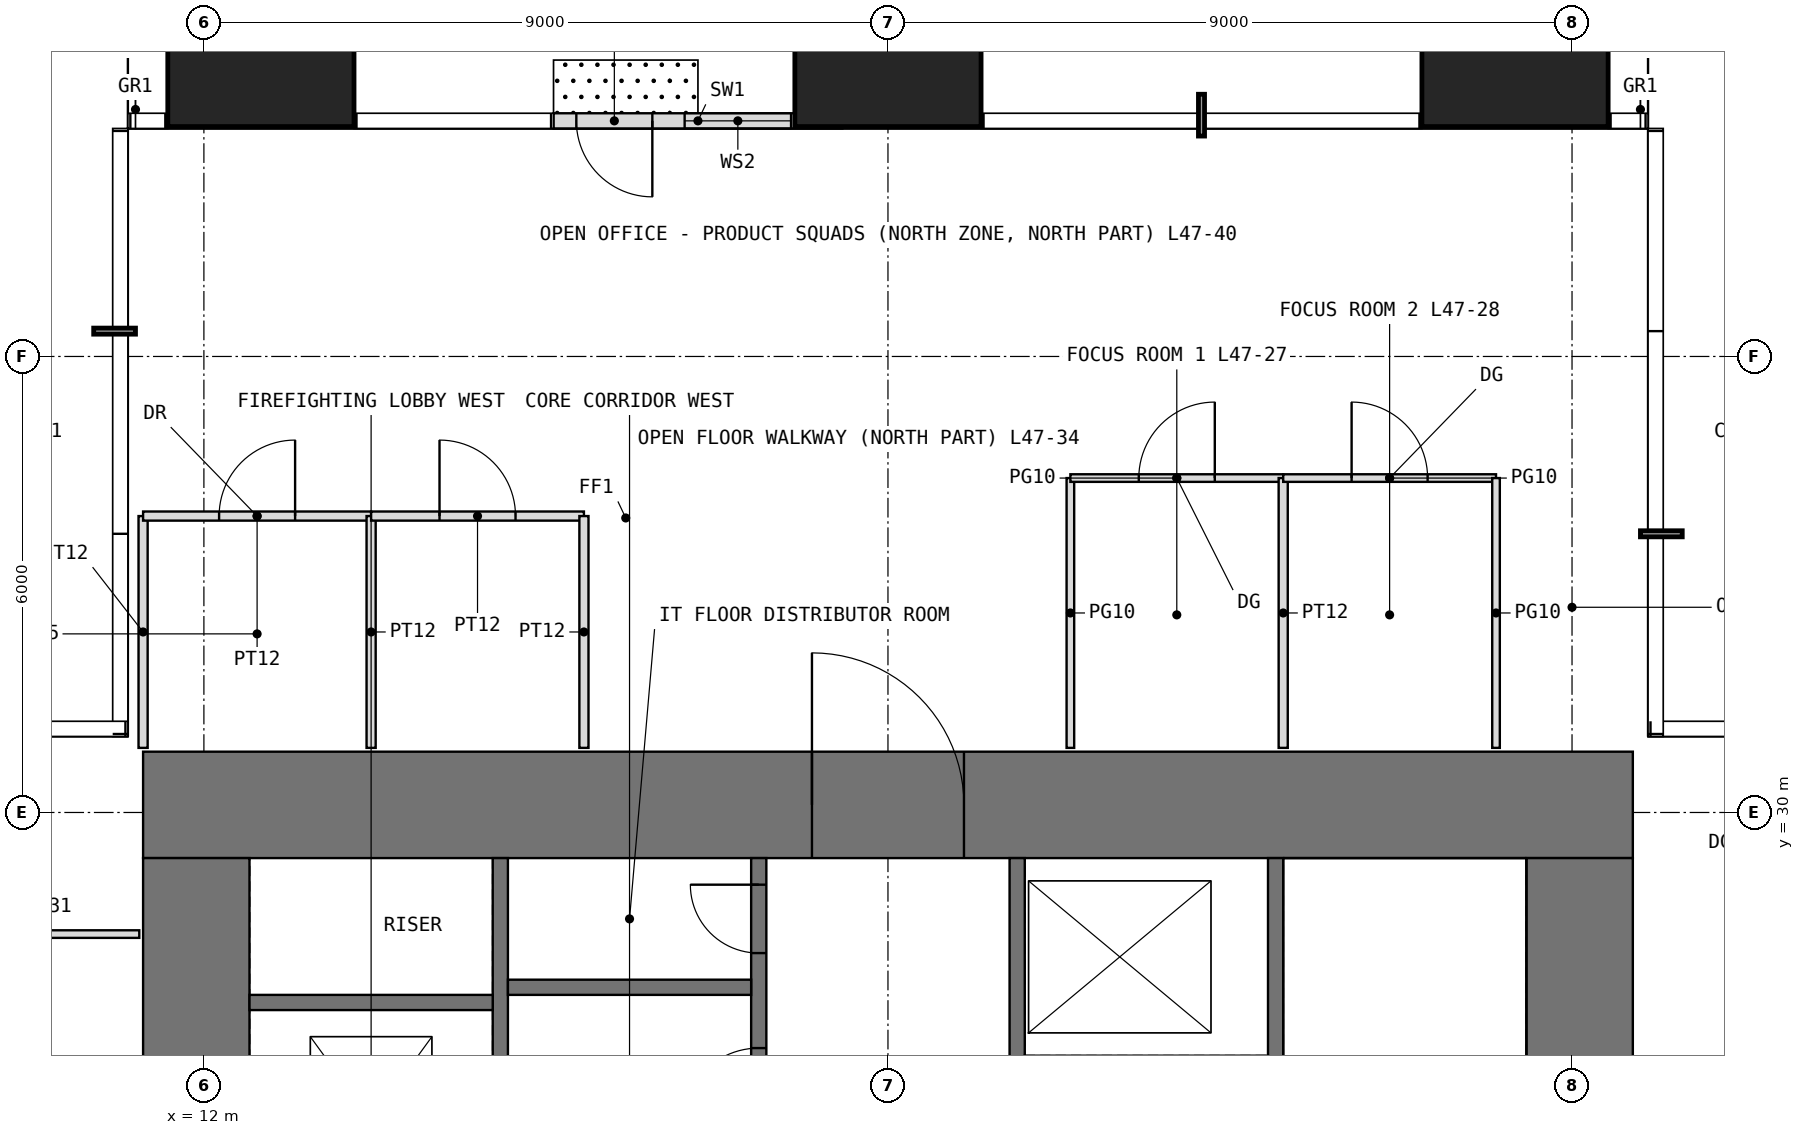
"""IFC4 building model, lengths in metres.
Left out: names, types, materials, properties, quantities, classifications, styles, units other than length and angle.
Written with IfcOpenShell. Run it as: python <this file> out.ifc"""

import sys

from ifc_helpers import new_model, si_unit, direction, frame, frame_2d, origin, origin_2d, place, context, subcontext, project, spatial, rectangle, extrude, element, fill, save


model = new_model("IFC4")
c1 = context("Model", 3, precision=1e-05, world=origin(), true_north=direction((0.0, 1.0)))
c2 = subcontext(c1, "Body", "Model", "MODEL_VIEW")
j1 = project(units=[si_unit("LENGTHUNIT", "METRE"), si_unit("PLANEANGLEUNIT", "RADIAN")], contexts=[c1])
p1 = place(None, origin())
s1 = spatial("IfcSite", under=j1, at=p1, CompositionType="ELEMENT")
p2 = place(p1, origin())
s2 = spatial("IfcBuilding", under=s1, at=p2, CompositionType="ELEMENT")
p3 = place(p2, frame((0.0, 0.0, 198.5)))
s3 = spatial("IfcBuildingStorey", under=s2, at=p3, CompositionType="ELEMENT", Elevation=198.5)
for number, where, z_axis, x_axis in (
    (1, (12.75, 40.25, 0.0), (0.0, 0.0, 1.0), (1.0, 0.0, 0.0)),
    (2, (21.0, 40.25, 0.0), (0.0, 0.0, 1.0), (1.0, 0.0, 0.0)),
    (3, (29.25, 40.25, 0.0), (0.0, 0.0, 1.0), (1.0, 0.0, 0.0)),
):
    element("IfcColumn", number, at=place(p3, frame(where, z_axis=z_axis, x_axis=x_axis)), inside=s3, PredefinedType="COLUMN", context=c2, shape_type="SweptSolid", body=[
        extrude(rectangle(XDim=2.45, YDim=2.45, at=origin_2d()), origin(), (0.0, 0.0, 1.0), 4.0),
    ])
p4 = place(p3, frame((20.4, 39.1, 0.0), z_axis=(0.0, 0.0, 1.0), x_axis=(-1.0, 0.0, 0.0)))
e4 = element("IfcWall", 4, at=p4, inside=s3, PredefinedType="USERDEFINED", context=c2, shape_type="SweptSolid", body=[
    extrude(rectangle(XDim=3.8, YDim=0.2, at=frame_2d((1.9, 0.0))), origin(), (0.0, 0.0, 1.0), 3.75),
])
p5 = place(p4, frame((2.5, 0.0, 0.0)))
e5 = element("IfcOpeningElement", 5, at=p5, cuts=e4, PredefinedType="OPENING", context=c2, shape_type="SweptSolid", body=[
    extrude(rectangle(XDim=1.0, YDim=2.4, at=frame_2d((0.5, 1.2))), frame((0.0, 0.11, 0.0), z_axis=(0.0, -1.0, 0.0), x_axis=(1.0, 0.0, 0.0)), (0.0, 0.0, 1.0), 0.22),
])
p6 = place(p4, frame((0.675, 0.0, 0.3)))
e6 = element("IfcOpeningElement", 6, at=p6, cuts=e4, PredefinedType="OPENING", context=c2, shape_type="SweptSolid", body=[
    extrude(rectangle(XDim=1.4, YDim=2.7, at=frame_2d((0.7, 1.35))), frame((0.0, 0.11, 0.0), z_axis=(0.0, -1.0, 0.0), x_axis=(1.0, 0.0, 0.0)), (0.0, 0.0, 1.0), 0.22),
])
p7 = place(p3, frame((11.2, 30.1, -0.05), z_axis=(0.0, 0.0, 1.0), x_axis=(1.0, 0.0, 0.0)))
e7 = element("IfcWall", 7, at=p7, inside=s3, PredefinedType="SHEAR", context=c2, shape_type="SweptSolid", body=[
    extrude(rectangle(XDim=19.6, YDim=1.4, at=frame_2d((9.8, 0.0))), origin(), (0.0, 0.0, 1.0), 4.0),
])
p8 = place(p7, frame((8.8, 0.0, 0.05)))
e8 = element("IfcOpeningElement", 8, at=p8, cuts=e7, PredefinedType="OPENING", context=c2, shape_type="SweptSolid", body=[
    extrude(rectangle(XDim=2.0, YDim=2.2, at=frame_2d((1.0, 1.1))), frame((0.0, 0.71, 0.0), z_axis=(0.0, -1.0, 0.0), x_axis=(1.0, 0.0, 0.0)), (0.0, 0.0, 1.0), 1.42),
])
p9 = place(p3, frame((11.9, 12.6, -0.05), z_axis=(0.0, 0.0, 1.0), x_axis=(0.0, 1.0, 0.0)))
e9 = element("IfcWall", 9, at=p9, inside=s3, PredefinedType="SHEAR", context=c2, shape_type="SweptSolid", body=[
    extrude(rectangle(XDim=16.8, YDim=1.4, at=frame_2d((8.4, 0.0))), origin(), (0.0, 0.0, 1.0), 4.0),
])
p10 = place(p9, frame((9.9, 0.0, 0.05)))
e10 = element("IfcOpeningElement", 10, at=p10, cuts=e9, PredefinedType="OPENING", context=c2, shape_type="SweptSolid", body=[
    extrude(rectangle(XDim=1.0, YDim=2.2, at=frame_2d((0.5, 1.1))), frame((0.0, 0.71, 0.0), z_axis=(0.0, -1.0, 0.0), x_axis=(1.0, 0.0, 0.0)), (0.0, 0.0, 1.0), 1.42),
])
p11 = place(p3, frame((30.1, 12.6, -0.05), z_axis=(0.0, 0.0, 1.0), x_axis=(0.0, 1.0, 0.0)))
e11 = element("IfcWall", 11, at=p11, inside=s3, PredefinedType="SHEAR", context=c2, shape_type="SweptSolid", body=[
    extrude(rectangle(XDim=16.8, YDim=1.4, at=frame_2d((8.4, 0.0))), origin(), (0.0, 0.0, 1.0), 4.0),
])
p12 = place(p11, frame((5.9, 0.0, 0.05)))
e12 = element("IfcOpeningElement", 12, at=p12, cuts=e11, PredefinedType="OPENING", context=c2, shape_type="SweptSolid", body=[
    extrude(rectangle(XDim=1.0, YDim=2.2, at=frame_2d((0.5, 1.1))), frame((0.0, 0.71, 0.0), z_axis=(0.0, -1.0, 0.0), x_axis=(1.0, 0.0, 0.0)), (0.0, 0.0, 1.0), 1.42),
])
p13 = place(p3, frame((15.9, 12.6, -0.05), z_axis=(0.0, 0.0, 1.0), x_axis=(0.0, 1.0, 0.0)))
e13 = element("IfcWall", 13, at=p13, inside=s3, PredefinedType="SHEAR", context=c2, shape_type="SweptSolid", body=[
    extrude(rectangle(XDim=16.8, YDim=0.2, at=frame_2d((8.4, 0.0))), origin(), (0.0, 0.0, 1.0), 4.0),
])
p14 = place(p13, frame((8.9, 0.0, 0.05)))
e14 = element("IfcOpeningElement", 14, at=p14, cuts=e13, PredefinedType="OPENING", context=c2, shape_type="SweptSolid", body=[
    extrude(rectangle(XDim=1.0, YDim=2.2, at=frame_2d((0.5, 1.1))), frame((0.0, 0.11, 0.0), z_axis=(0.0, -1.0, 0.0), x_axis=(1.0, 0.0, 0.0)), (0.0, 0.0, 1.0), 0.22),
])
p15 = place(p3, frame((19.3, 12.6, -0.05), z_axis=(0.0, 0.0, 1.0), x_axis=(0.0, 1.0, 0.0)))
e15 = element("IfcWall", 15, at=p15, inside=s3, PredefinedType="SHEAR", context=c2, shape_type="SweptSolid", body=[
    extrude(rectangle(XDim=16.8, YDim=0.2, at=frame_2d((8.4, 0.0))), origin(), (0.0, 0.0, 1.0), 4.0),
])
p16 = place(p15, frame((8.7, 0.0, 0.05)))
e16 = element("IfcOpeningElement", 16, at=p16, cuts=e15, PredefinedType="OPENING", context=c2, shape_type="SweptSolid", body=[
    extrude(rectangle(XDim=1.0, YDim=2.2, at=frame_2d((0.5, 1.1))), frame((0.0, 0.11, 0.0), z_axis=(0.0, -1.0, 0.0), x_axis=(1.0, 0.0, 0.0)), (0.0, 0.0, 1.0), 0.22),
])
p17 = place(p15, frame((10.85, 0.0, 0.05)))
e17 = element("IfcOpeningElement", 17, at=p17, cuts=e15, PredefinedType="OPENING", context=c2, shape_type="SweptSolid", body=[
    extrude(rectangle(XDim=0.9, YDim=2.2, at=frame_2d((0.45, 1.1))), frame((0.0, 0.11, 0.0), z_axis=(0.0, -1.0, 0.0), x_axis=(1.0, 0.0, 0.0)), (0.0, 0.0, 1.0), 0.22),
])
p18 = place(p15, frame((13.3, 0.0, 0.05)))
e18 = element("IfcOpeningElement", 18, at=p18, cuts=e15, PredefinedType="OPENING", context=c2, shape_type="SweptSolid", body=[
    extrude(rectangle(XDim=1.0, YDim=2.2, at=frame_2d((0.5, 1.1))), frame((0.0, 0.11, 0.0), z_axis=(0.0, -1.0, 0.0), x_axis=(1.0, 0.0, 0.0)), (0.0, 0.0, 1.0), 0.22),
])
p19 = place(p15, frame((15.55, 0.0, 0.05)))
e19 = element("IfcOpeningElement", 19, at=p19, cuts=e15, PredefinedType="OPENING", context=c2, shape_type="SweptSolid", body=[
    extrude(rectangle(XDim=0.9, YDim=2.2, at=frame_2d((0.45, 1.1))), frame((0.0, 0.11, 0.0), z_axis=(0.0, -1.0, 0.0), x_axis=(1.0, 0.0, 0.0)), (0.0, 0.0, 1.0), 0.22),
])
p20 = place(p15, frame((0.75, 0.0, 0.05)))
e20 = element("IfcOpeningElement", 20, at=p20, cuts=e15, PredefinedType="OPENING", context=c2, shape_type="SweptSolid", body=[
    extrude(rectangle(XDim=1.1, YDim=2.2, at=frame_2d((0.55, 1.1))), frame((0.0, 0.11, 0.0), z_axis=(0.0, -1.0, 0.0), x_axis=(1.0, 0.0, 0.0)), (0.0, 0.0, 1.0), 0.22),
])
p21 = place(p15, frame((3.55, 0.0, 0.05)))
e21 = element("IfcOpeningElement", 21, at=p21, cuts=e15, PredefinedType="OPENING", context=c2, shape_type="SweptSolid", body=[
    extrude(rectangle(XDim=1.1, YDim=2.2, at=frame_2d((0.55, 1.1))), frame((0.0, 0.11, 0.0), z_axis=(0.0, -1.0, 0.0), x_axis=(1.0, 0.0, 0.0)), (0.0, 0.0, 1.0), 0.22),
])
p22 = place(p15, frame((6.35, 0.0, 0.05)))
e22 = element("IfcOpeningElement", 22, at=p22, cuts=e15, PredefinedType="OPENING", context=c2, shape_type="SweptSolid", body=[
    extrude(rectangle(XDim=1.1, YDim=2.2, at=frame_2d((0.55, 1.1))), frame((0.0, 0.11, 0.0), z_axis=(0.0, -1.0, 0.0), x_axis=(1.0, 0.0, 0.0)), (0.0, 0.0, 1.0), 0.22),
])
p23 = place(p3, frame((22.7, 12.6, -0.05), z_axis=(0.0, 0.0, 1.0), x_axis=(0.0, 1.0, 0.0)))
e23 = element("IfcWall", 23, at=p23, inside=s3, PredefinedType="SHEAR", context=c2, shape_type="SweptSolid", body=[
    extrude(rectangle(XDim=16.8, YDim=0.2, at=frame_2d((8.4, 0.0))), origin(), (0.0, 0.0, 1.0), 4.0),
])
p24 = place(p23, frame((0.45, 0.0, 0.05)))
e24 = element("IfcOpeningElement", 24, at=p24, cuts=e23, PredefinedType="OPENING", context=c2, shape_type="SweptSolid", body=[
    extrude(rectangle(XDim=0.9, YDim=2.2, at=frame_2d((0.45, 1.1))), frame((0.0, 0.11, 0.0), z_axis=(0.0, -1.0, 0.0), x_axis=(1.0, 0.0, 0.0)), (0.0, 0.0, 1.0), 0.22),
])
p25 = place(p23, frame((7.1, 0.0, 0.05)))
e25 = element("IfcOpeningElement", 25, at=p25, cuts=e23, PredefinedType="OPENING", context=c2, shape_type="SweptSolid", body=[
    extrude(rectangle(XDim=1.0, YDim=2.2, at=frame_2d((0.5, 1.1))), frame((0.0, 0.11, 0.0), z_axis=(0.0, -1.0, 0.0), x_axis=(1.0, 0.0, 0.0)), (0.0, 0.0, 1.0), 0.22),
])
p26 = place(p23, frame((1.95, 0.0, 0.05)))
e26 = element("IfcOpeningElement", 26, at=p26, cuts=e23, PredefinedType="OPENING", context=c2, shape_type="SweptSolid", body=[
    extrude(rectangle(XDim=0.9, YDim=2.2, at=frame_2d((0.45, 1.1))), frame((0.0, 0.11, 0.0), z_axis=(0.0, -1.0, 0.0), x_axis=(1.0, 0.0, 0.0)), (0.0, 0.0, 1.0), 0.22),
])
p27 = place(p23, frame((4.95, 0.0, 0.05)))
e27 = element("IfcOpeningElement", 27, at=p27, cuts=e23, PredefinedType="OPENING", context=c2, shape_type="SweptSolid", body=[
    extrude(rectangle(XDim=0.9, YDim=2.2, at=frame_2d((0.45, 1.1))), frame((0.0, 0.11, 0.0), z_axis=(0.0, -1.0, 0.0), x_axis=(1.0, 0.0, 0.0)), (0.0, 0.0, 1.0), 0.22),
])
p28 = place(p23, frame((9.4, 0.0, 0.05)))
e28 = element("IfcOpeningElement", 28, at=p28, cuts=e23, PredefinedType="OPENING", context=c2, shape_type="SweptSolid", body=[
    extrude(rectangle(XDim=1.0, YDim=2.2, at=frame_2d((0.5, 1.1))), frame((0.0, 0.11, 0.0), z_axis=(0.0, -1.0, 0.0), x_axis=(1.0, 0.0, 0.0)), (0.0, 0.0, 1.0), 0.22),
])
p29 = place(p23, frame((12.2, 0.0, 0.05)))
e29 = element("IfcOpeningElement", 29, at=p29, cuts=e23, PredefinedType="OPENING", context=c2, shape_type="SweptSolid", body=[
    extrude(rectangle(XDim=1.0, YDim=2.2, at=frame_2d((0.5, 1.1))), frame((0.0, 0.11, 0.0), z_axis=(0.0, -1.0, 0.0), x_axis=(1.0, 0.0, 0.0)), (0.0, 0.0, 1.0), 0.22),
])
p30 = place(p3, frame((26.1, 12.6, -0.05), z_axis=(0.0, 0.0, 1.0), x_axis=(0.0, 1.0, 0.0)))
e30 = element("IfcWall", 30, at=p30, inside=s3, PredefinedType="SHEAR", context=c2, shape_type="SweptSolid", body=[
    extrude(rectangle(XDim=16.8, YDim=0.2, at=frame_2d((8.4, 0.0))), origin(), (0.0, 0.0, 1.0), 4.0),
])
p31 = place(p30, frame((6.9, 0.0, 0.05)))
e31 = element("IfcOpeningElement", 31, at=p31, cuts=e30, PredefinedType="OPENING", context=c2, shape_type="SweptSolid", body=[
    extrude(rectangle(XDim=1.0, YDim=2.2, at=frame_2d((0.5, 1.1))), frame((0.0, 0.11, 0.0), z_axis=(0.0, -1.0, 0.0), x_axis=(1.0, 0.0, 0.0)), (0.0, 0.0, 1.0), 0.22),
])
for number, where, z_axis, x_axis in (
    (32, (12.6, 27.5, -0.05), (0.0, 0.0, 1.0), (1.0, 0.0, 0.0)),
    (33, (16.0, 27.7, -0.05), (0.0, 0.0, 1.0), (1.0, 0.0, 0.0)),
):
    element("IfcWall", number, at=place(p3, frame(where, z_axis=z_axis, x_axis=x_axis)), inside=s3, PredefinedType="SHEAR", context=c2, shape_type="SweptSolid", body=[
        extrude(rectangle(XDim=3.2, YDim=0.2, at=frame_2d((1.6, 0.0))), origin(), (0.0, 0.0, 1.0), 4.0),
    ])
p32 = place(p3, frame((8.4, 28.4, 0.0), z_axis=(0.0, 0.0, 1.0), x_axis=(1.0, 0.0, 0.0)))
e34 = element("IfcWall", 34, at=p32, inside=s3, PredefinedType="PARTITIONING", context=c2, shape_type="SweptSolid", body=[
    extrude(rectangle(XDim=2.75, YDim=0.1, at=frame_2d((1.375, 0.0))), origin(), (0.0, 0.0, 1.0), 3.75),
])
p33 = place(p3, frame((11.2, 30.85, 0.0), z_axis=(0.0, 0.0, 1.0), x_axis=(0.0, 1.0, 0.0)))
e35 = element("IfcWall", 35, at=p33, inside=s3, PredefinedType="PARTITIONING", context=c2, shape_type="SweptSolid", body=[
    extrude(rectangle(XDim=3.05, YDim=0.12, at=frame_2d((1.525, 0.0))), origin(), (0.0, 0.0, 1.0), 3.75),
])
p34 = place(p3, frame((11.2, 33.9, 0.0), z_axis=(0.0, 0.0, 1.0), x_axis=(1.0, 0.0, 0.0)))
e36 = element("IfcWall", 36, at=p34, inside=s3, PredefinedType="PARTITIONING", context=c2, shape_type="SweptSolid", body=[
    extrude(rectangle(XDim=3.0, YDim=0.12, at=frame_2d((1.5, 0.0))), origin(), (0.0, 0.0, 1.0), 3.75),
])
p35 = place(p34, frame((1.0, 0.0, 0.0)))
e37 = element("IfcOpeningElement", 37, at=p35, cuts=e36, PredefinedType="OPENING", context=c2, shape_type="SweptSolid", body=[
    extrude(rectangle(XDim=1.0, YDim=2.2, at=frame_2d((0.5, 1.1))), frame((0.0, 0.07, 0.0), z_axis=(0.0, -1.0, 0.0), x_axis=(1.0, 0.0, 0.0)), (0.0, 0.0, 1.0), 0.14),
])
p36 = place(p3, frame((14.2, 30.85, 0.0), z_axis=(0.0, 0.0, 1.0), x_axis=(0.0, 1.0, 0.0)))
e38 = element("IfcWall", 38, at=p36, inside=s3, PredefinedType="PARTITIONING", context=c2, shape_type="SweptSolid", body=[
    extrude(rectangle(XDim=3.05, YDim=0.12, at=frame_2d((1.525, 0.0))), origin(), (0.0, 0.0, 1.0), 3.75),
])
p37 = place(p3, frame((14.2, 33.9, 0.0), z_axis=(0.0, 0.0, 1.0), x_axis=(1.0, 0.0, 0.0)))
e39 = element("IfcWall", 39, at=p37, inside=s3, PredefinedType="PARTITIONING", context=c2, shape_type="SweptSolid", body=[
    extrude(rectangle(XDim=2.8, YDim=0.12, at=frame_2d((1.4, 0.0))), origin(), (0.0, 0.0, 1.0), 3.75),
])
p38 = place(p37, frame((0.9, 0.0, 0.0)))
e40 = element("IfcOpeningElement", 40, at=p38, cuts=e39, PredefinedType="OPENING", context=c2, shape_type="SweptSolid", body=[
    extrude(rectangle(XDim=1.0, YDim=2.2, at=frame_2d((0.5, 1.1))), frame((0.0, 0.07, 0.0), z_axis=(0.0, -1.0, 0.0), x_axis=(1.0, 0.0, 0.0)), (0.0, 0.0, 1.0), 0.14),
])
p39 = place(p3, frame((17.0, 30.85, 0.0), z_axis=(0.0, 0.0, 1.0), x_axis=(0.0, 1.0, 0.0)))
e41 = element("IfcWall", 41, at=p39, inside=s3, PredefinedType="PARTITIONING", context=c2, shape_type="SweptSolid", body=[
    extrude(rectangle(XDim=3.05, YDim=0.12, at=frame_2d((1.525, 0.0))), origin(), (0.0, 0.0, 1.0), 3.75),
])
p40 = place(p3, frame((23.4, 30.85, 0.0), z_axis=(0.0, 0.0, 1.0), x_axis=(0.0, 1.0, 0.0)))
e42 = element("IfcWall", 42, at=p40, inside=s3, PredefinedType="PARTITIONING", context=c2, shape_type="SweptSolid", body=[
    extrude(rectangle(XDim=3.55, YDim=0.1, at=frame_2d((1.775, 0.0))), origin(), (0.0, 0.0, 1.0), 3.75),
])
p41 = place(p3, frame((23.4, 34.4, 0.0), z_axis=(0.0, 0.0, 1.0), x_axis=(1.0, 0.0, 0.0)))
e43 = element("IfcWall", 43, at=p41, inside=s3, PredefinedType="PARTITIONING", context=c2, shape_type="SweptSolid", body=[
    extrude(rectangle(XDim=2.8, YDim=0.1, at=frame_2d((1.4, 0.0))), origin(), (0.0, 0.0, 1.0), 3.75),
])
p42 = place(p41, frame((0.9, 0.0, 0.0)))
e44 = element("IfcOpeningElement", 44, at=p42, cuts=e43, PredefinedType="OPENING", context=c2, shape_type="SweptSolid", body=[
    extrude(rectangle(XDim=1.0, YDim=2.4, at=frame_2d((0.5, 1.2))), frame((0.0, 0.06, 0.0), z_axis=(0.0, -1.0, 0.0), x_axis=(1.0, 0.0, 0.0)), (0.0, 0.0, 1.0), 0.12),
])
p43 = place(p3, frame((26.2, 30.85, 0.0), z_axis=(0.0, 0.0, 1.0), x_axis=(0.0, 1.0, 0.0)))
e45 = element("IfcWall", 45, at=p43, inside=s3, PredefinedType="PARTITIONING", context=c2, shape_type="SweptSolid", body=[
    extrude(rectangle(XDim=3.55, YDim=0.12, at=frame_2d((1.775, 0.0))), origin(), (0.0, 0.0, 1.0), 3.75),
])
p44 = place(p3, frame((26.2, 34.4, 0.0), z_axis=(0.0, 0.0, 1.0), x_axis=(1.0, 0.0, 0.0)))
e46 = element("IfcWall", 46, at=p44, inside=s3, PredefinedType="PARTITIONING", context=c2, shape_type="SweptSolid", body=[
    extrude(rectangle(XDim=2.8, YDim=0.1, at=frame_2d((1.4, 0.0))), origin(), (0.0, 0.0, 1.0), 3.75),
])
p45 = place(p44, frame((0.9, 0.0, 0.0)))
e47 = element("IfcOpeningElement", 47, at=p45, cuts=e46, PredefinedType="OPENING", context=c2, shape_type="SweptSolid", body=[
    extrude(rectangle(XDim=1.0, YDim=2.4, at=frame_2d((0.5, 1.2))), frame((0.0, 0.06, 0.0), z_axis=(0.0, -1.0, 0.0), x_axis=(1.0, 0.0, 0.0)), (0.0, 0.0, 1.0), 0.12),
])
p46 = place(p3, frame((29.0, 30.85, 0.0), z_axis=(0.0, 0.0, 1.0), x_axis=(0.0, 1.0, 0.0)))
e48 = element("IfcWall", 48, at=p46, inside=s3, PredefinedType="PARTITIONING", context=c2, shape_type="SweptSolid", body=[
    extrude(rectangle(XDim=3.55, YDim=0.1, at=frame_2d((1.775, 0.0))), origin(), (0.0, 0.0, 1.0), 3.75),
])
p47 = place(p5, origin())
e49 = element("IfcDoor", 49, at=p47, inside=s3, OperationType="SINGLE_SWING_LEFT", PredefinedType="DOOR", context=c2, shape_type="SweptSolid", body=[
    extrude(rectangle(XDim=1.0, YDim=2.4, at=frame_2d((0.5, 1.2))), frame((0.0, 0.025, 0.0), z_axis=(0.0, -1.0, 0.0), x_axis=(1.0, 0.0, 0.0)), (0.0, 0.0, 1.0), 0.05),
])
fill(e5, e49)
p48 = place(p6, origin())
e50 = element("IfcWindow", 50, at=p48, inside=s3, PartitioningType="SINGLE_PANEL", PredefinedType="WINDOW", context=c2, shape_type="SweptSolid", body=[
    extrude(rectangle(XDim=1.4, YDim=2.7, at=frame_2d((0.7, 1.35))), frame((0.0, 0.03, 0.0), z_axis=(0.0, -1.0, 0.0), x_axis=(1.0, 0.0, 0.0)), (0.0, 0.0, 1.0), 0.06),
])
fill(e6, e50)
p49 = place(p8, origin())
e51 = element("IfcDoor", 51, at=p49, inside=s3, OperationType="DOUBLE_DOOR_SINGLE_SWING", PredefinedType="DOOR", context=c2, shape_type="SweptSolid", body=[
    extrude(rectangle(XDim=2.0, YDim=2.2, at=frame_2d((1.0, 1.1))), frame((0.0, 0.025, 0.0), z_axis=(0.0, -1.0, 0.0), x_axis=(1.0, 0.0, 0.0)), (0.0, 0.0, 1.0), 0.05),
])
fill(e8, e51)
p50 = place(p18, origin())
e52 = element("IfcDoor", 52, at=p50, inside=s3, OperationType="SINGLE_SWING_LEFT", PredefinedType="DOOR", context=c2, shape_type="SweptSolid", body=[
    extrude(rectangle(XDim=1.0, YDim=2.2, at=frame_2d((0.5, 1.1))), frame((0.0, 0.025, 0.0), z_axis=(0.0, -1.0, 0.0), x_axis=(1.0, 0.0, 0.0)), (0.0, 0.0, 1.0), 0.05),
])
fill(e18, e52)
p51 = place(p19, origin())
e53 = element("IfcDoor", 53, at=p51, inside=s3, OperationType="SINGLE_SWING_RIGHT", PredefinedType="DOOR", context=c2, shape_type="SweptSolid", body=[
    extrude(rectangle(XDim=0.9, YDim=2.2, at=frame_2d((0.45, 1.1))), frame((0.0, 0.025, 0.0), z_axis=(0.0, -1.0, 0.0), x_axis=(1.0, 0.0, 0.0)), (0.0, 0.0, 1.0), 0.05),
])
fill(e19, e53)
p52 = place(p35, origin())
e54 = element("IfcDoor", 54, at=p52, inside=s3, OperationType="SINGLE_SWING_RIGHT", PredefinedType="DOOR", context=c2, shape_type="SweptSolid", body=[
    extrude(rectangle(XDim=1.0, YDim=2.2, at=frame_2d((0.5, 1.1))), frame((0.0, 0.025, 0.0), z_axis=(0.0, -1.0, 0.0), x_axis=(1.0, 0.0, 0.0)), (0.0, 0.0, 1.0), 0.05),
])
fill(e37, e54)
p53 = place(p38, origin())
e55 = element("IfcDoor", 55, at=p53, inside=s3, OperationType="SINGLE_SWING_LEFT", PredefinedType="DOOR", context=c2, shape_type="SweptSolid", body=[
    extrude(rectangle(XDim=1.0, YDim=2.2, at=frame_2d((0.5, 1.1))), frame((0.0, 0.025, 0.0), z_axis=(0.0, -1.0, 0.0), x_axis=(1.0, 0.0, 0.0)), (0.0, 0.0, 1.0), 0.05),
])
fill(e40, e55)
p54 = place(p42, origin())
e56 = element("IfcDoor", 56, at=p54, inside=s3, OperationType="SINGLE_SWING_RIGHT", PredefinedType="DOOR", context=c2, shape_type="SweptSolid", body=[
    extrude(rectangle(XDim=1.0, YDim=2.4, at=frame_2d((0.5, 1.2))), frame((0.0, 0.025, 0.0), z_axis=(0.0, -1.0, 0.0), x_axis=(1.0, 0.0, 0.0)), (0.0, 0.0, 1.0), 0.05),
])
fill(e44, e56)
p55 = place(p45, origin())
e57 = element("IfcDoor", 57, at=p55, inside=s3, OperationType="SINGLE_SWING_LEFT", PredefinedType="DOOR", context=c2, shape_type="SweptSolid", body=[
    extrude(rectangle(XDim=1.0, YDim=2.4, at=frame_2d((0.5, 1.2))), frame((0.0, 0.025, 0.0), z_axis=(0.0, -1.0, 0.0), x_axis=(1.0, 0.0, 0.0)), (0.0, 0.0, 1.0), 0.05),
])
fill(e47, e57)
save(model, sys.argv[1])
